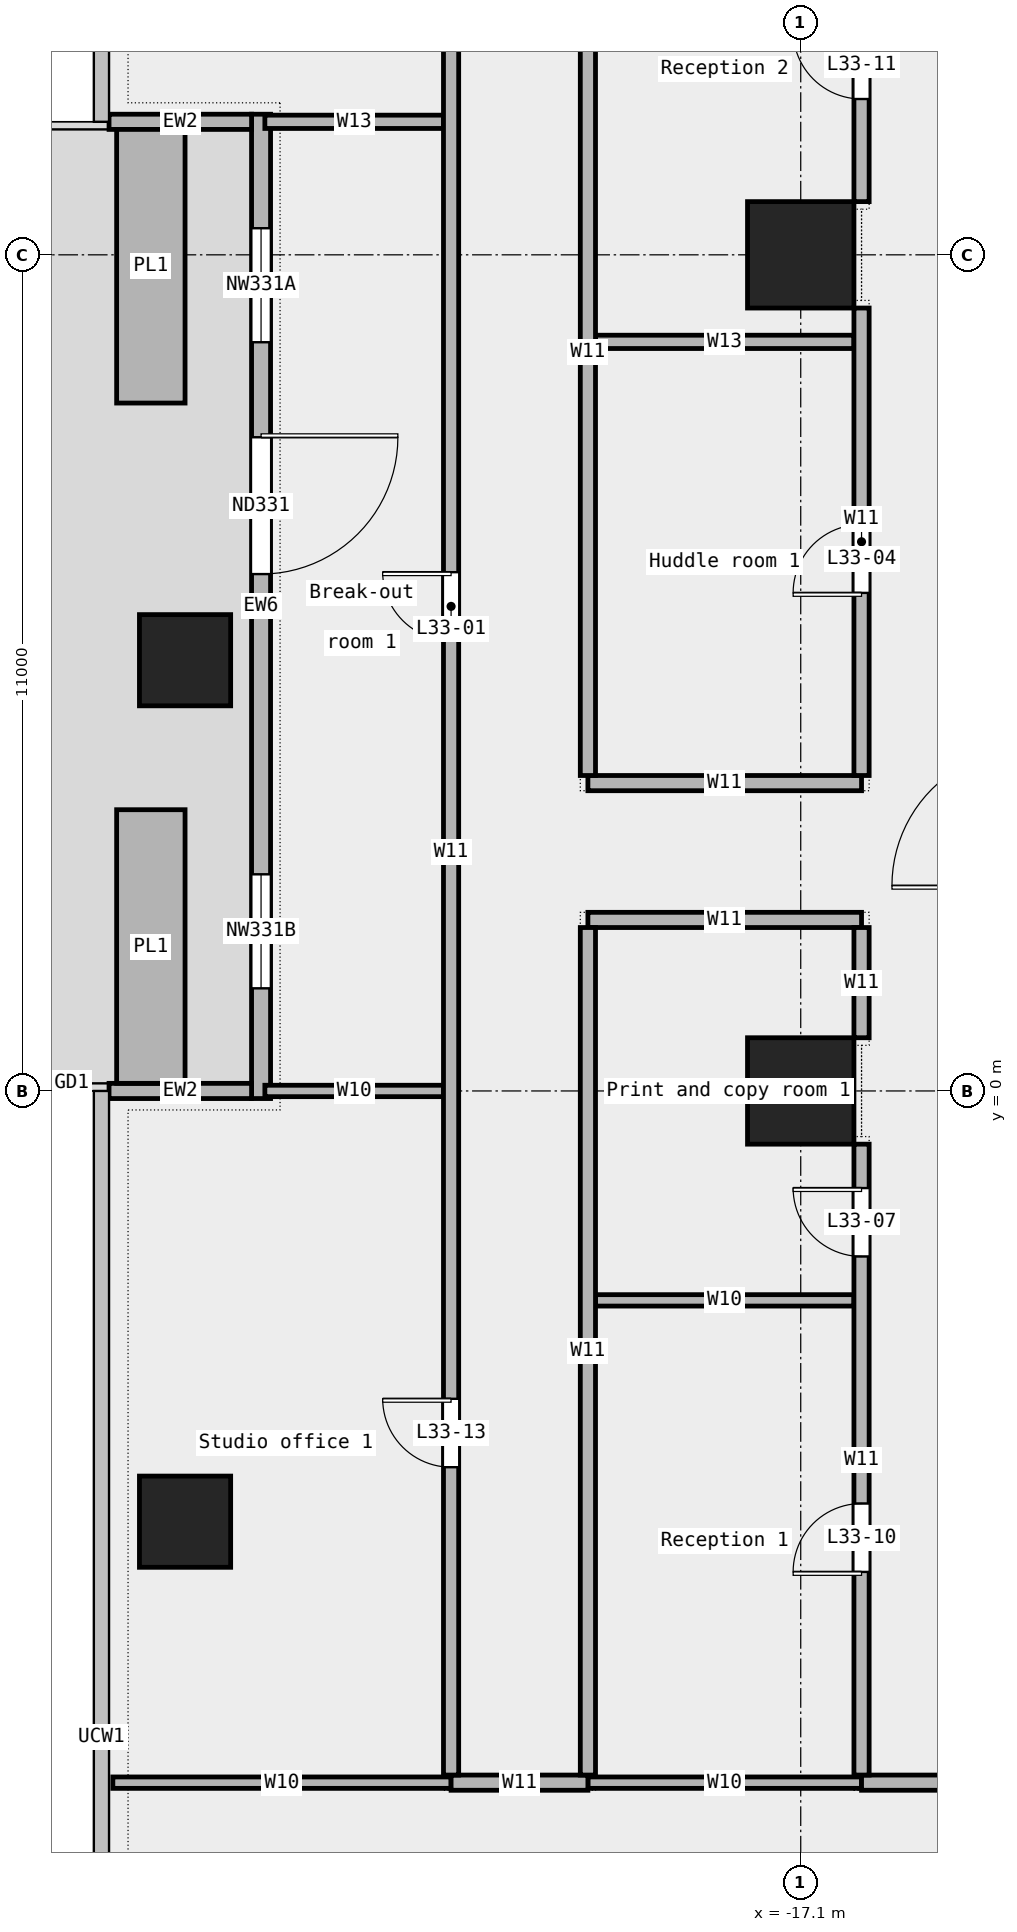
"""IFC4 building model, lengths in metres.
Left out: names, types, materials, properties, quantities, classifications, styles, units other than length and angle.
Written with IfcOpenShell. Run it as: python <this file> out.ifc"""

import sys

from ifc_helpers import new_model, si_unit, direction, frame, frame_2d, origin, origin_2d, place, context, subcontext, project, spatial, rectangle, extrude, element, fill, save


model = new_model("IFC4")
c1 = context("Model", 3, precision=1e-05, world=origin(), true_north=direction((0.0, 1.0)))
c2 = subcontext(c1, "Body", "Model", "MODEL_VIEW")
j1 = project(units=[si_unit("LENGTHUNIT", "METRE"), si_unit("PLANEANGLEUNIT", "RADIAN")], contexts=[c1])
p1 = place(None, origin())
s1 = spatial("IfcSite", under=j1, at=p1, CompositionType="ELEMENT")
p2 = place(p1, origin())
s2 = spatial("IfcBuilding", under=s1, at=p2, CompositionType="ELEMENT")
p3 = place(p2, frame((0.0, 0.0, 165.0)))
s3 = spatial("IfcBuildingStorey", under=s2, at=p3, CompositionType="ELEMENT", Elevation=165.0)
for number, where, z_axis, x_axis in (
    (1, (-25.2, 5.667, 0.0), (0.0, 0.0, 1.0), (1.0, 0.0, 0.0)),
    (2, (-25.2, -5.667, 0.0), (0.0, 0.0, 1.0), (1.0, 0.0, 0.0)),
):
    element("IfcColumn", number, at=place(p3, frame(where, z_axis=z_axis, x_axis=x_axis)), inside=s3, PredefinedType="COLUMN", context=c2, shape_type="SweptSolid", body=[
        extrude(rectangle(XDim=1.2, YDim=1.2, at=origin_2d()), origin(), (0.0, 0.0, 1.0), 3.6),
    ])
for number, where, z_axis, x_axis in (
    (3, (-17.1, 0.0, 0.0), (0.0, 0.0, 1.0), (1.0, 0.0, 0.0)),
    (4, (-17.1, 11.0, 0.0), (0.0, 0.0, 1.0), (1.0, 0.0, 0.0)),
):
    element("IfcColumn", number, at=place(p3, frame(where, z_axis=z_axis, x_axis=x_axis)), inside=s3, PredefinedType="COLUMN", context=c2, shape_type="SweptSolid", body=[
        extrude(rectangle(XDim=1.4, YDim=1.4, at=origin_2d()), origin(), (0.0, 0.0, 1.0), 3.6),
    ])
p4 = place(p3, frame((-24.2, 12.85, 0.0), z_axis=(0.0, 0.0, 1.0), x_axis=(0.0, -1.0, 0.0)))
e5 = element("IfcWall", 5, at=p4, inside=s3, PredefinedType="STANDARD", context=c2, shape_type="SweptSolid", body=[
    extrude(rectangle(XDim=12.95, YDim=0.25, at=frame_2d((6.475, 0.0))), origin(), (0.0, 0.0, 1.0), 3.6),
])
p5 = place(p4, frame((1.5, 0.0, 0.45)))
e6 = element("IfcOpeningElement", 6, at=p5, cuts=e5, PredefinedType="OPENING", context=c2, shape_type="SweptSolid", body=[
    extrude(rectangle(XDim=1.5, YDim=2.4, at=frame_2d((0.75, 1.2))), frame((0.0, 0.137, 0.0), z_axis=(0.0, -1.0, 0.0), x_axis=(1.0, 0.0, 0.0)), (0.0, 0.0, 1.0), 0.274),
])
p6 = place(p4, frame((4.25, 0.0, 0.0)))
e7 = element("IfcOpeningElement", 7, at=p6, cuts=e5, PredefinedType="OPENING", context=c2, shape_type="SweptSolid", body=[
    extrude(rectangle(XDim=1.8, YDim=2.4, at=frame_2d((0.9, 1.2))), frame((0.0, 0.137, 0.0), z_axis=(0.0, -1.0, 0.0), x_axis=(1.0, 0.0, 0.0)), (0.0, 0.0, 1.0), 0.274),
])
p7 = place(p4, frame((10.0, 0.0, 0.45)))
e8 = element("IfcOpeningElement", 8, at=p7, cuts=e5, PredefinedType="OPENING", context=c2, shape_type="SweptSolid", body=[
    extrude(rectangle(XDim=1.5, YDim=2.4, at=frame_2d((0.75, 1.2))), frame((0.0, 0.137, 0.0), z_axis=(0.0, -1.0, 0.0), x_axis=(1.0, 0.0, 0.0)), (0.0, 0.0, 1.0), 0.274),
])
for number, where, z_axis, x_axis in (
    (9, (-26.2, 12.75, 0.0), (0.0, 0.0, 1.0), (1.0, 0.0, 0.0)),
    (10, (-26.2, 0.0, 0.0), (0.0, 0.0, 1.0), (1.0, 0.0, 0.0)),
):
    element("IfcWall", number, at=place(p3, frame(where, z_axis=z_axis, x_axis=x_axis)), inside=s3, PredefinedType="STANDARD", context=c2, shape_type="SweptSolid", body=[
        extrude(rectangle(XDim=1.875, YDim=0.2, at=frame_2d((0.938, 0.0))), origin(), (0.0, 0.0, 1.0), 3.6),
    ])
for number, where, z_axis, x_axis in (
    (11, (-25.65, 12.65, 0.0), (0.0, 0.0, 1.0), (0.0, -1.0, 0.0)),
    (12, (-25.65, 3.7, 0.0), (0.0, 0.0, 1.0), (0.0, -1.0, 0.0)),
):
    element("IfcWall", number, at=place(p3, frame(where, z_axis=z_axis, x_axis=x_axis)), inside=s3, PredefinedType="STANDARD", context=c2, shape_type="SweptSolid", body=[
        extrude(rectangle(XDim=3.6, YDim=0.9, at=frame_2d((1.8, 0.0))), origin(), (0.0, 0.0, 1.0), 0.7),
    ])
p8 = place(p3, frame((-26.15, -9.1, 0.0), z_axis=(0.0, 0.0, 1.0), x_axis=(1.0, 0.0, 0.0)))
e13 = element("IfcWall", 13, at=p8, inside=s3, PredefinedType="PARTITIONING", context=c2, shape_type="SweptSolid", body=[
    extrude(rectangle(XDim=4.45, YDim=0.15, at=frame_2d((2.225, 0.0))), origin(), (0.0, 0.0, 1.0), 3.6),
])
p9 = place(p3, frame((-19.9, -9.1, 0.0), z_axis=(0.0, 0.0, 1.0), x_axis=(1.0, 0.0, 0.0)))
e14 = element("IfcWall", 14, at=p9, inside=s3, PredefinedType="PARTITIONING", context=c2, shape_type="SweptSolid", body=[
    extrude(rectangle(XDim=3.6, YDim=0.15, at=frame_2d((1.8, 0.0))), origin(), (0.0, 0.0, 1.0), 3.6),
])
p10 = place(p3, frame((-21.7, -9.1, 0.0), z_axis=(0.0, 0.0, 1.0), x_axis=(1.0, 0.0, 0.0)))
e15 = element("IfcWall", 15, at=p10, inside=s3, PredefinedType="PARTITIONING", context=c2, shape_type="SweptSolid", body=[
    extrude(rectangle(XDim=1.8, YDim=0.2, at=frame_2d((0.9, 0.0))), origin(), (0.0, 0.0, 1.0), 3.6),
])
p11 = place(p3, frame((-16.3, -9.1, 0.0), z_axis=(0.0, 0.0, 1.0), x_axis=(1.0, 0.0, 0.0)))
e16 = element("IfcWall", 16, at=p11, inside=s3, PredefinedType="PARTITIONING", context=c2, shape_type="SweptSolid", body=[
    extrude(rectangle(XDim=5.02, YDim=0.2, at=frame_2d((2.51, 0.0))), origin(), (0.0, 0.0, 1.0), 3.6),
])
p12 = place(p3, frame((-19.8, -2.755, 0.0), z_axis=(0.0, 0.0, 1.0), x_axis=(1.0, 0.0, 0.0)))
e17 = element("IfcWall", 17, at=p12, inside=s3, PredefinedType="PARTITIONING", context=c2, shape_type="SweptSolid", body=[
    extrude(rectangle(XDim=3.4, YDim=0.15, at=frame_2d((1.7, 0.0))), origin(), (0.0, 0.0, 1.0), 3.6),
])
p13 = place(p3, frame((-24.15, 0.0, 0.0), z_axis=(0.0, 0.0, 1.0), x_axis=(1.0, 0.0, 0.0)))
e18 = element("IfcWall", 18, at=p13, inside=s3, PredefinedType="PARTITIONING", context=c2, shape_type="SweptSolid", body=[
    extrude(rectangle(XDim=2.35, YDim=0.15, at=frame_2d((1.175, 0.0))), origin(), (0.0, 0.0, 1.0), 3.6),
])
for number, where, z_axis, x_axis in (
    (19, (-19.9, 2.25, 0.0), (0.0, 0.0, 1.0), (1.0, 0.0, 0.0)),
    (20, (-19.9, 4.05, 0.0), (0.0, 0.0, 1.0), (1.0, 0.0, 0.0)),
):
    element("IfcWall", number, at=place(p3, frame(where, z_axis=z_axis, x_axis=x_axis)), inside=s3, PredefinedType="PARTITIONING", context=c2, shape_type="SweptSolid", body=[
        extrude(rectangle(XDim=3.6, YDim=0.2, at=frame_2d((1.8, 0.0))), origin(), (0.0, 0.0, 1.0), 3.6),
    ])
p14 = place(p3, frame((-19.8, 9.855, 0.0), z_axis=(0.0, 0.0, 1.0), x_axis=(1.0, 0.0, 0.0)))
e21 = element("IfcWall", 21, at=p14, inside=s3, PredefinedType="PARTITIONING", context=c2, shape_type="SweptSolid", body=[
    extrude(rectangle(XDim=3.4, YDim=0.175, at=frame_2d((1.7, 0.0))), origin(), (0.0, 0.0, 1.0), 3.6),
])
p15 = place(p3, frame((-24.15, 12.75, 0.0), z_axis=(0.0, 0.0, 1.0), x_axis=(1.0, 0.0, 0.0)))
e22 = element("IfcWall", 22, at=p15, inside=s3, PredefinedType="PARTITIONING", context=c2, shape_type="SweptSolid", body=[
    extrude(rectangle(XDim=2.35, YDim=0.175, at=frame_2d((1.175, 0.0))), origin(), (0.0, 0.0, 1.0), 3.6),
])
p16 = place(p3, frame((-21.7, -9.0, 0.0), z_axis=(0.0, 0.0, 1.0), x_axis=(0.0, 1.0, 0.0)))
e23 = element("IfcWall", 23, at=p16, inside=s3, PredefinedType="PARTITIONING", context=c2, shape_type="SweptSolid", body=[
    extrude(rectangle(XDim=24.3, YDim=0.2, at=frame_2d((12.15, 0.0))), origin(), (0.0, 0.0, 1.0), 3.6),
])
p17 = place(p16, frame((14.925, 0.0, 0.0)))
e24 = element("IfcOpeningElement", 24, at=p17, cuts=e23, PredefinedType="OPENING", context=c2, shape_type="SweptSolid", body=[
    extrude(rectangle(XDim=0.9, YDim=2.1, at=frame_2d((0.45, 1.05))), frame((0.0, 0.112, 0.0), z_axis=(0.0, -1.0, 0.0), x_axis=(1.0, 0.0, 0.0)), (0.0, 0.0, 1.0), 0.224),
])
p18 = place(p16, frame((4.05, 0.0, 0.0)))
e25 = element("IfcOpeningElement", 25, at=p18, cuts=e23, PredefinedType="OPENING", context=c2, shape_type="SweptSolid", body=[
    extrude(rectangle(XDim=0.9, YDim=2.1, at=frame_2d((0.45, 1.05))), frame((0.0, 0.112, 0.0), z_axis=(0.0, -1.0, 0.0), x_axis=(1.0, 0.0, 0.0)), (0.0, 0.0, 1.0), 0.224),
])
p19 = place(p3, frame((-19.9, -9.0, 0.0), z_axis=(0.0, 0.0, 1.0), x_axis=(0.0, 1.0, 0.0)))
e26 = element("IfcWall", 26, at=p19, inside=s3, PredefinedType="PARTITIONING", context=c2, shape_type="SweptSolid", body=[
    extrude(rectangle(XDim=11.15, YDim=0.2, at=frame_2d((5.575, 0.0))), origin(), (0.0, 0.0, 1.0), 3.6),
])
p20 = place(p3, frame((-19.9, 4.15, 0.0), z_axis=(0.0, 0.0, 1.0), x_axis=(0.0, 1.0, 0.0)))
e27 = element("IfcWall", 27, at=p20, inside=s3, PredefinedType="PARTITIONING", context=c2, shape_type="SweptSolid", body=[
    extrude(rectangle(XDim=11.15, YDim=0.2, at=frame_2d((5.575, 0.0))), origin(), (0.0, 0.0, 1.0), 3.6),
])
p21 = place(p3, frame((-16.3, -9.0, 0.0), z_axis=(0.0, 0.0, 1.0), x_axis=(0.0, 1.0, 0.0)))
e28 = element("IfcWall", 28, at=p21, inside=s3, PredefinedType="PARTITIONING", context=c2, shape_type="SweptSolid", body=[
    extrude(rectangle(XDim=8.3, YDim=0.2, at=frame_2d((4.15, 0.0))), origin(), (0.0, 0.0, 1.0), 3.6),
])
p22 = place(p21, frame((6.823, 0.0, 0.0)))
e29 = element("IfcOpeningElement", 29, at=p22, cuts=e28, PredefinedType="OPENING", context=c2, shape_type="SweptSolid", body=[
    extrude(rectangle(XDim=0.9, YDim=2.1, at=frame_2d((0.45, 1.05))), frame((0.0, 0.112, 0.0), z_axis=(0.0, -1.0, 0.0), x_axis=(1.0, 0.0, 0.0)), (0.0, 0.0, 1.0), 0.224),
])
p23 = place(p21, frame((2.673, 0.0, 0.0)))
e30 = element("IfcOpeningElement", 30, at=p23, cuts=e28, PredefinedType="OPENING", context=c2, shape_type="SweptSolid", body=[
    extrude(rectangle(XDim=0.9, YDim=2.1, at=frame_2d((0.45, 1.05))), frame((0.0, 0.112, 0.0), z_axis=(0.0, -1.0, 0.0), x_axis=(1.0, 0.0, 0.0)), (0.0, 0.0, 1.0), 0.224),
])
p24 = place(p3, frame((-16.3, 0.7, 0.0), z_axis=(0.0, 0.0, 1.0), x_axis=(0.0, 1.0, 0.0)))
e31 = element("IfcWall", 31, at=p24, inside=s3, PredefinedType="PARTITIONING", context=c2, shape_type="SweptSolid", body=[
    extrude(rectangle(XDim=1.45, YDim=0.2, at=frame_2d((0.725, 0.0))), origin(), (0.0, 0.0, 1.0), 3.6),
])
p25 = place(p3, frame((-16.3, 4.15, 0.0), z_axis=(0.0, 0.0, 1.0), x_axis=(0.0, 1.0, 0.0)))
e32 = element("IfcWall", 32, at=p25, inside=s3, PredefinedType="PARTITIONING", context=c2, shape_type="SweptSolid", body=[
    extrude(rectangle(XDim=6.15, YDim=0.2, at=frame_2d((3.075, 0.0))), origin(), (0.0, 0.0, 1.0), 3.6),
])
p26 = place(p25, frame((2.403, 0.0, 0.0)))
e33 = element("IfcOpeningElement", 33, at=p26, cuts=e32, PredefinedType="OPENING", context=c2, shape_type="SweptSolid", body=[
    extrude(rectangle(XDim=0.9, YDim=2.1, at=frame_2d((0.45, 1.05))), frame((0.0, 0.112, 0.0), z_axis=(0.0, -1.0, 0.0), x_axis=(1.0, 0.0, 0.0)), (0.0, 0.0, 1.0), 0.224),
])
p27 = place(p3, frame((-16.3, 11.7, 0.0), z_axis=(0.0, 0.0, 1.0), x_axis=(0.0, 1.0, 0.0)))
e34 = element("IfcWall", 34, at=p27, inside=s3, PredefinedType="PARTITIONING", context=c2, shape_type="SweptSolid", body=[
    extrude(rectangle(XDim=3.6, YDim=0.2, at=frame_2d((1.8, 0.0))), origin(), (0.0, 0.0, 1.0), 3.6),
])
p28 = place(p27, frame((1.35, 0.0, 0.0)))
e35 = element("IfcOpeningElement", 35, at=p28, cuts=e34, PredefinedType="OPENING", context=c2, shape_type="SweptSolid", body=[
    extrude(rectangle(XDim=0.9, YDim=2.1, at=frame_2d((0.45, 1.05))), frame((0.0, 0.112, 0.0), z_axis=(0.0, -1.0, 0.0), x_axis=(1.0, 0.0, 0.0)), (0.0, 0.0, 1.0), 0.224),
])
p29 = place(p5, origin())
e36 = element("IfcWindow", 36, at=p29, inside=s3, PartitioningType="SINGLE_PANEL", PredefinedType="WINDOW", context=c2, shape_type="SweptSolid", body=[
    extrude(rectangle(XDim=1.5, YDim=2.4, at=frame_2d((0.75, 1.2))), frame((0.0, 0.03, 0.0), z_axis=(0.0, -1.0, 0.0), x_axis=(1.0, 0.0, 0.0)), (0.0, 0.0, 1.0), 0.06),
])
fill(e6, e36)
p30 = place(p6, origin())
e37 = element("IfcDoor", 37, at=p30, inside=s3, OperationType="DOUBLE_DOOR_SINGLE_SWING", PredefinedType="DOOR", context=c2, shape_type="SweptSolid", body=[
    extrude(rectangle(XDim=1.8, YDim=2.4, at=frame_2d((0.9, 1.2))), frame((0.0, 0.025, 0.0), z_axis=(0.0, -1.0, 0.0), x_axis=(1.0, 0.0, 0.0)), (0.0, 0.0, 1.0), 0.05),
])
fill(e7, e37)
p31 = place(p7, origin())
e38 = element("IfcWindow", 38, at=p31, inside=s3, PartitioningType="SINGLE_PANEL", PredefinedType="WINDOW", context=c2, shape_type="SweptSolid", body=[
    extrude(rectangle(XDim=1.5, YDim=2.4, at=frame_2d((0.75, 1.2))), frame((0.0, 0.03, 0.0), z_axis=(0.0, -1.0, 0.0), x_axis=(1.0, 0.0, 0.0)), (0.0, 0.0, 1.0), 0.06),
])
fill(e8, e38)
p32 = place(p17, origin())
e39 = element("IfcDoor", 39, at=p32, inside=s3, OperationType="SINGLE_SWING_RIGHT", PredefinedType="DOOR", context=c2, shape_type="SweptSolid", body=[
    extrude(rectangle(XDim=0.9, YDim=2.1, at=frame_2d((0.45, 1.05))), frame((0.0, 0.025, 0.0), z_axis=(0.0, -1.0, 0.0), x_axis=(1.0, 0.0, 0.0)), (0.0, 0.0, 1.0), 0.05),
])
fill(e24, e39)
p33 = place(p26, origin())
e40 = element("IfcDoor", 40, at=p33, inside=s3, OperationType="SINGLE_SWING_LEFT", PredefinedType="DOOR", context=c2, shape_type="SweptSolid", body=[
    extrude(rectangle(XDim=0.9, YDim=2.1, at=frame_2d((0.45, 1.05))), frame((0.0, 0.025, 0.0), z_axis=(0.0, -1.0, 0.0), x_axis=(1.0, 0.0, 0.0)), (0.0, 0.0, 1.0), 0.05),
])
fill(e33, e40)
p34 = place(p22, origin())
e41 = element("IfcDoor", 41, at=p34, inside=s3, OperationType="SINGLE_SWING_RIGHT", PredefinedType="DOOR", context=c2, shape_type="SweptSolid", body=[
    extrude(rectangle(XDim=0.9, YDim=2.1, at=frame_2d((0.45, 1.05))), frame((0.0, 0.025, 0.0), z_axis=(0.0, -1.0, 0.0), x_axis=(1.0, 0.0, 0.0)), (0.0, 0.0, 1.0), 0.05),
])
fill(e29, e41)
p35 = place(p23, origin())
e42 = element("IfcDoor", 42, at=p35, inside=s3, OperationType="SINGLE_SWING_LEFT", PredefinedType="DOOR", context=c2, shape_type="SweptSolid", body=[
    extrude(rectangle(XDim=0.9, YDim=2.1, at=frame_2d((0.45, 1.05))), frame((0.0, 0.025, 0.0), z_axis=(0.0, -1.0, 0.0), x_axis=(1.0, 0.0, 0.0)), (0.0, 0.0, 1.0), 0.05),
])
fill(e30, e42)
p36 = place(p28, origin())
e43 = element("IfcDoor", 43, at=p36, inside=s3, OperationType="SINGLE_SWING_RIGHT", PredefinedType="DOOR", context=c2, shape_type="SweptSolid", body=[
    extrude(rectangle(XDim=0.9, YDim=2.1, at=frame_2d((0.45, 1.05))), frame((0.0, 0.025, 0.0), z_axis=(0.0, -1.0, 0.0), x_axis=(1.0, 0.0, 0.0)), (0.0, 0.0, 1.0), 0.05),
])
fill(e35, e43)
p37 = place(p18, origin())
e44 = element("IfcDoor", 44, at=p37, inside=s3, OperationType="SINGLE_SWING_RIGHT", PredefinedType="DOOR", context=c2, shape_type="SweptSolid", body=[
    extrude(rectangle(XDim=0.9, YDim=2.1, at=frame_2d((0.45, 1.05))), frame((0.0, 0.025, 0.0), z_axis=(0.0, -1.0, 0.0), x_axis=(1.0, 0.0, 0.0)), (0.0, 0.0, 1.0), 0.05),
])
fill(e25, e44)
save(model, sys.argv[1])
